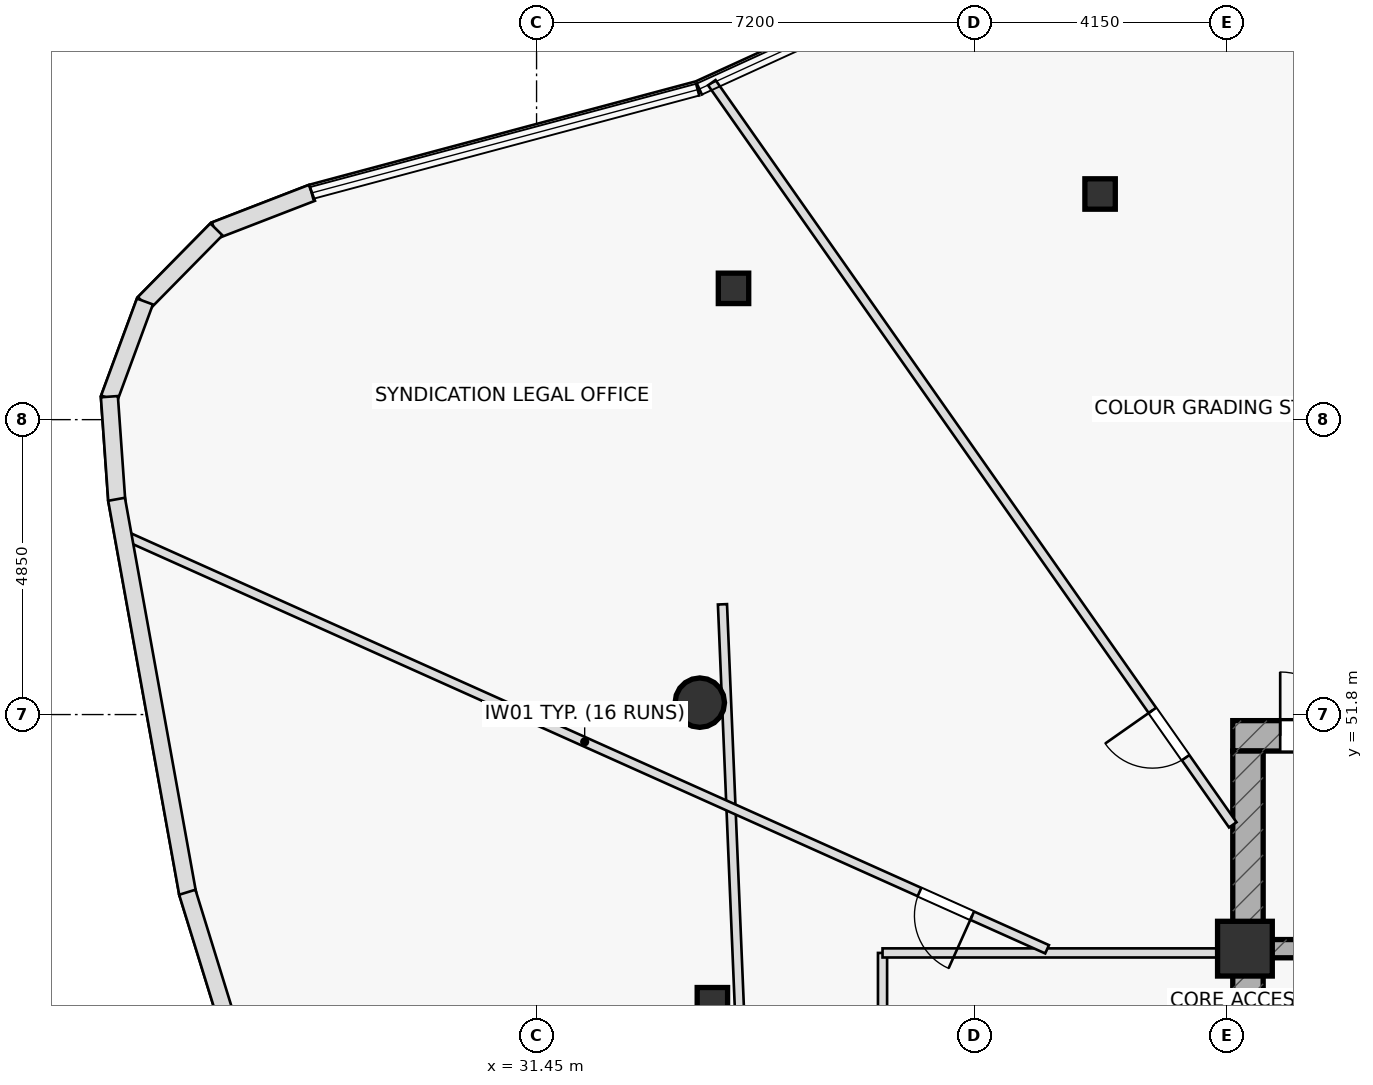
"""IFC4 building model, lengths in metres.
Left out: names, types, materials, properties, quantities, classifications, styles, units other than length and angle.
Written with IfcOpenShell. Run it as: python <this file> out.ifc"""

import sys

from ifc_helpers import new_model, si_unit, direction, frame, frame_2d, origin, origin_2d, place, context, subcontext, project, spatial, rectangle, hollow_rectangle, hollow_circle, extrude, element, fill, save


model = new_model("IFC4")
c1 = context("Model", 3, precision=1e-05, world=origin(), true_north=direction((0.0, 1.0)))
c2 = subcontext(c1, "Body", "Model", "MODEL_VIEW")
j1 = project(units=[si_unit("LENGTHUNIT", "METRE"), si_unit("PLANEANGLEUNIT", "RADIAN")], contexts=[c1])
p1 = place(None, origin())
s1 = spatial("IfcSite", under=j1, at=p1, CompositionType="ELEMENT")
p2 = place(p1, origin())
s2 = spatial("IfcBuilding", under=s1, at=p2, CompositionType="ELEMENT")
p3 = place(p2, frame((0.0, 0.0, 285.5)))
s3 = spatial("IfcBuildingStorey", under=s2, at=p3, CompositionType="ELEMENT", Elevation=285.5)
p4 = place(p3, frame((42.9, 51.45, 0.0), z_axis=(0.0, 0.0, 1.0), x_axis=(1.0, 0.0, 0.0)))
e1 = element("IfcWall", 1, at=p4, inside=s3, PredefinedType="SHEAR", context=c2, shape_type="SweptSolid", body=[
    extrude(rectangle(XDim=14.2, YDim=0.5, at=frame_2d((7.1, 0.0))), origin(), (0.0, 0.0, 1.0), 3.7),
])
p5 = place(p4, frame((0.78, 0.0, 0.0)))
e2 = element("IfcOpeningElement", 2, at=p5, cuts=e1, PredefinedType="OPENING", context=c2, shape_type="SweptSolid", body=[
    extrude(rectangle(XDim=1.05, YDim=2.2, at=frame_2d((0.525, 1.1))), frame((0.0, 0.26, 0.0), z_axis=(0.0, -1.0, 0.0), x_axis=(1.0, 0.0, 0.0)), (0.0, 0.0, 1.0), 0.52),
])
p6 = place(p3, frame((43.15, 38.8, 0.0), z_axis=(0.0, 0.0, 1.0), x_axis=(0.0, 1.0, 0.0)))
e3 = element("IfcWall", 3, at=p6, inside=s3, PredefinedType="SHEAR", context=c2, shape_type="SweptSolid", body=[
    extrude(rectangle(XDim=12.4, YDim=0.5, at=frame_2d((6.2, 0.0))), origin(), (0.0, 0.0, 1.0), 3.7),
])
p7 = place(p3, frame((43.4, 47.95, 0.0), z_axis=(0.0, 0.0, 1.0), x_axis=(1.0, 0.0, 0.0)))
e4 = element("IfcWall", 4, at=p7, inside=s3, PredefinedType="SHEAR", context=c2, shape_type="SweptSolid", body=[
    extrude(rectangle(XDim=13.2, YDim=0.3, at=frame_2d((6.6, 0.0))), origin(), (0.0, 0.0, 1.0), 3.7),
])
p8 = place(p7, frame((8.345, 0.0, 0.0)))
e5 = element("IfcOpeningElement", 5, at=p8, cuts=e4, PredefinedType="OPENING", context=c2, shape_type="SweptSolid", body=[
    extrude(rectangle(XDim=1.15, YDim=2.2, at=frame_2d((0.575, 1.1))), frame((0.0, 0.16, 0.0), z_axis=(0.0, -1.0, 0.0), x_axis=(1.0, 0.0, 0.0)), (0.0, 0.0, 1.0), 0.32),
])
p9 = place(p7, frame((10.065, 0.0, 0.0)))
e6 = element("IfcOpeningElement", 6, at=p9, cuts=e4, PredefinedType="OPENING", context=c2, shape_type="SweptSolid", body=[
    extrude(rectangle(XDim=1.15, YDim=2.2, at=frame_2d((0.575, 1.1))), frame((0.0, 0.16, 0.0), z_axis=(0.0, -1.0, 0.0), x_axis=(1.0, 0.0, 0.0)), (0.0, 0.0, 1.0), 0.32),
])
p10 = place(p7, frame((11.645, 0.0, 0.0)))
e7 = element("IfcOpeningElement", 7, at=p10, cuts=e4, PredefinedType="OPENING", context=c2, shape_type="SweptSolid", body=[
    extrude(rectangle(XDim=1.15, YDim=2.2, at=frame_2d((0.575, 1.1))), frame((0.0, 0.16, 0.0), z_axis=(0.0, -1.0, 0.0), x_axis=(1.0, 0.0, 0.0)), (0.0, 0.0, 1.0), 0.32),
])
p11 = place(p3, frame((43.1, 47.95, 0.0), z_axis=(0.0, 0.0, 1.0), x_axis=(1.0, 0.0, 0.0)))
e8 = element("IfcColumn", 8, at=p11, inside=s3, PredefinedType="COLUMN", context=c2, shape_type="SweptSolid", body=[
    extrude(rectangle(XDim=0.9, YDim=0.9, at=origin_2d()), origin(), (0.0, 0.0, 1.0), 3.7),
])
p12 = place(p3, frame((34.135, 51.996, 0.0), z_axis=(0.0, 0.0, 1.0), x_axis=(1.0, 0.0, 0.0)))
e9 = element("IfcColumn", 9, at=p12, inside=s3, PredefinedType="COLUMN", context=c2, shape_type="SweptSolid", body=[
    extrude(hollow_circle(Radius=0.406, WallThickness=0.036, at=origin_2d()), origin(), (0.0, 0.0, 1.0), 3.7),
])
for number, where, z_axis, x_axis in (
    (10, (34.342, 47.061, 0.0), (0.0, 0.0, 1.0), (1.0, 0.0, 0.0)),
    (11, (40.718, 60.361, 0.0), (0.0, 0.0, 1.0), (1.0, 0.0, 0.0)),
    (12, (34.689, 58.809, 0.0), (0.0, 0.0, 1.0), (1.0, 0.0, 0.0)),
):
    element("IfcColumn", number, at=place(p3, frame(where, z_axis=z_axis, x_axis=x_axis)), inside=s3, PredefinedType="COLUMN", context=c2, shape_type="SweptSolid", body=[
        extrude(hollow_rectangle(XDim=0.5, YDim=0.5, WallThickness=0.03, at=origin_2d()), origin(), (0.0, 0.0, 1.0), 3.7),
    ])
p13 = place(p3, frame((34.507, 53.613, 0.0), z_axis=(0.0, 0.0, 1.0), x_axis=(0.041875090182, -0.999122853718, 0.0)))
e13 = element("IfcWall", 13, at=p13, inside=s3, PredefinedType="PARTITIONING", context=c2, shape_type="SweptSolid", body=[
    extrude(rectangle(XDim=8.139, YDim=0.15, at=frame_2d((4.069, 0.0))), origin(), (0.0, 0.0, 1.0), 3.235),
])
p14 = place(p3, frame((37.14, 40.3, 0.0), z_axis=(0.0, 0.0, 1.0), x_axis=(0.0, 1.0, 0.0)))
e14 = element("IfcWall", 14, at=p14, inside=s3, PredefinedType="PARTITIONING", context=c2, shape_type="SweptSolid", body=[
    extrude(rectangle(XDim=7.58, YDim=0.15, at=frame_2d((3.79, 0.0))), origin(), (0.0, 0.0, 1.0), 3.7),
])
p15 = place(p3, frame((37.14, 47.88, 0.0), z_axis=(0.0, 0.0, 1.0), x_axis=(1.0, 0.0, 0.0)))
e15 = element("IfcWall", 15, at=p15, inside=s3, PredefinedType="PARTITIONING", context=c2, shape_type="SweptSolid", body=[
    extrude(rectangle(XDim=5.76, YDim=0.15, at=frame_2d((2.88, 0.0))), origin(), (0.0, 0.0, 1.0), 3.7),
])
p16 = place(p3, frame((42.9, 49.986, 0.0), z_axis=(0.0, 0.0, 1.0), x_axis=(-0.574534288992, 0.818480513373, 0.0)))
e16 = element("IfcWall", 16, at=p16, inside=s3, PredefinedType="PARTITIONING", context=c2, shape_type="SweptSolid", body=[
    extrude(rectangle(XDim=14.912, YDim=0.15, at=frame_2d((7.456, 0.0))), origin(), (0.0, 0.0, 1.0), 3.175),
])
p17 = place(p16, frame((1.35, 0.0, 0.0)))
e17 = element("IfcOpeningElement", 17, at=p17, cuts=e16, PredefinedType="OPENING", context=c2, shape_type="SweptSolid", body=[
    extrude(rectangle(XDim=0.95, YDim=2.05, at=frame_2d((0.475, 1.025))), frame((0.0, 0.085, 0.0), z_axis=(0.0, -1.0, 0.0), x_axis=(1.0, 0.0, 0.0)), (0.0, 0.0, 1.0), 0.17),
])
p18 = place(p3, frame((39.846, 47.94, 0.0), z_axis=(0.0, 0.0, 1.0), x_axis=(-0.912400712577, 0.409298106139, 0.0)))
e18 = element("IfcWall", 18, at=p18, inside=s3, PredefinedType="PARTITIONING", context=c2, shape_type="SweptSolid", body=[
    extrude(rectangle(XDim=16.67, YDim=0.15, at=frame_2d((8.335, 0.0))), origin(), (0.0, 0.0, 1.0), 3.175),
])
p19 = place(p18, frame((1.35, 0.0, 0.0)))
e19 = element("IfcOpeningElement", 19, at=p19, cuts=e18, PredefinedType="OPENING", context=c2, shape_type="SweptSolid", body=[
    extrude(rectangle(XDim=0.95, YDim=2.05, at=frame_2d((0.475, 1.025))), frame((0.0, 0.085, 0.0), z_axis=(0.0, -1.0, 0.0), x_axis=(1.0, 0.0, 0.0)), (0.0, 0.0, 1.0), 0.17),
])
p20 = place(p3, frame((27.756, 60.38, 0.0), z_axis=(0.0, 0.0, 1.0), x_axis=(-0.932648667565, -0.36078589619, 0.0)))
e20 = element("IfcWall", 20, at=p20, inside=s3, PredefinedType="STANDARD", context=c2, shape_type="SweptSolid", body=[
    extrude(rectangle(XDim=1.711, YDim=0.28, at=frame_2d((0.855, 0.0))), origin(), (0.0, 0.0, 1.0), 3.7),
])
p21 = place(p3, frame((26.185, 59.779, 0.0), z_axis=(0.0, 0.0, 1.0), x_axis=(-0.7014796282, -0.712689505479, 0.0)))
e21 = element("IfcWall", 21, at=p21, inside=s3, PredefinedType="STANDARD", context=c2, shape_type="SweptSolid", body=[
    extrude(rectangle(XDim=1.699, YDim=0.28, at=frame_2d((0.849, 0.0))), origin(), (0.0, 0.0, 1.0), 3.7),
])
p22 = place(p3, frame((25.009, 58.593, 0.0), z_axis=(0.0, 0.0, 1.0), x_axis=(-0.346158128974, -0.938176182678, 0.0)))
e22 = element("IfcWall", 22, at=p22, inside=s3, PredefinedType="STANDARD", context=c2, shape_type="SweptSolid", body=[
    extrude(rectangle(XDim=1.699, YDim=0.28, at=frame_2d((0.85, 0.0))), origin(), (0.0, 0.0, 1.0), 3.7),
])
p23 = place(p3, frame((24.425, 57.028, 0.0), z_axis=(0.0, 0.0, 1.0), x_axis=(0.070632192383, -0.997502427766, 0.0)))
e23 = element("IfcWall", 23, at=p23, inside=s3, PredefinedType="STANDARD", context=c2, shape_type="SweptSolid", body=[
    extrude(rectangle(XDim=1.721, YDim=0.28, at=frame_2d((0.861, 0.0))), origin(), (0.0, 0.0, 1.0), 3.7),
])
p24 = place(p3, frame((24.542, 55.34, 0.0), z_axis=(0.0, 0.0, 1.0), x_axis=(0.177481394919, -0.984124156018, 0.0)))
e24 = element("IfcWall", 24, at=p24, inside=s3, PredefinedType="STANDARD", context=c2, shape_type="SweptSolid", body=[
    extrude(rectangle(XDim=6.596, YDim=0.28, at=frame_2d((3.298, 0.0))), origin(), (0.0, 0.0, 1.0), 3.7),
])
p25 = place(p3, frame((25.706, 48.878, 0.0), z_axis=(0.0, 0.0, 1.0), x_axis=(0.295281654046, -0.955410249466, 0.0)))
e25 = element("IfcWall", 25, at=p25, inside=s3, PredefinedType="STANDARD", context=c2, shape_type="SweptSolid", body=[
    extrude(rectangle(XDim=6.584, YDim=0.28, at=frame_2d((3.292, 0.0))), origin(), (0.0, 0.0, 1.0), 3.7),
])
p26 = place(p5, origin())
e26 = element("IfcDoor", 26, at=p26, inside=s3, OperationType="SINGLE_SWING_LEFT", PredefinedType="DOOR", context=c2, shape_type="SweptSolid", body=[
    extrude(rectangle(XDim=1.05, YDim=2.2, at=frame_2d((0.525, 1.1))), frame((0.0, 0.025, 0.0), z_axis=(0.0, -1.0, 0.0), x_axis=(1.0, 0.0, 0.0)), (0.0, 0.0, 1.0), 0.05),
])
fill(e2, e26)
p27 = place(p17, origin())
e27 = element("IfcDoor", 27, at=p27, inside=s3, OperationType="SINGLE_SWING_RIGHT", PredefinedType="DOOR", context=c2, shape_type="SweptSolid", body=[
    extrude(rectangle(XDim=0.95, YDim=2.05, at=frame_2d((0.475, 1.025))), frame((0.0, 0.025, 0.0), z_axis=(0.0, -1.0, 0.0), x_axis=(1.0, 0.0, 0.0)), (0.0, 0.0, 1.0), 0.05),
])
fill(e17, e27)
p28 = place(p19, origin())
e28 = element("IfcDoor", 28, at=p28, inside=s3, OperationType="SINGLE_SWING_LEFT", PredefinedType="DOOR", context=c2, shape_type="SweptSolid", body=[
    extrude(rectangle(XDim=0.95, YDim=2.05, at=frame_2d((0.475, 1.025))), frame((0.0, 0.025, 0.0), z_axis=(0.0, -1.0, 0.0), x_axis=(1.0, 0.0, 0.0)), (0.0, 0.0, 1.0), 0.05),
])
fill(e19, e28)
save(model, sys.argv[1])
